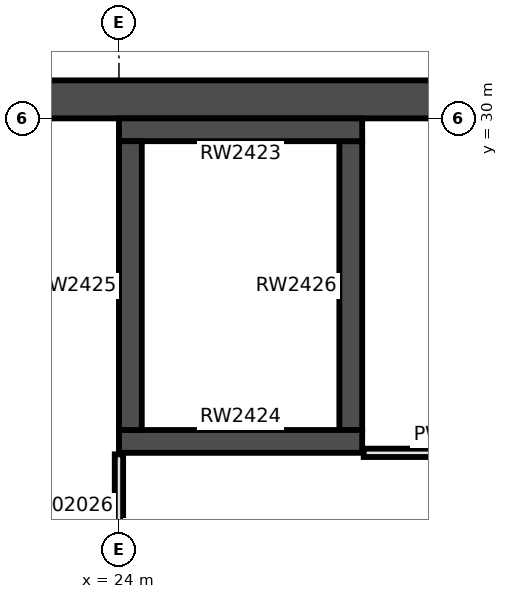
"""IFC4 building model, lengths in metres.
Left out: names, types, materials, properties, quantities, classifications, styles, units other than length and angle.
Written with IfcOpenShell. Run it as: python <this file> out.ifc"""

import sys

from ifc_helpers import new_model, si_unit, direction, frame, frame_2d, origin, place, context, subcontext, project, spatial, rectangle, extrude, element, fill, save


model = new_model("IFC4")
c1 = context("Model", 3, precision=1e-05, world=origin(), true_north=direction((0.0, 1.0)))
c2 = subcontext(c1, "Body", "Model", "MODEL_VIEW")
j1 = project(units=[si_unit("LENGTHUNIT", "METRE"), si_unit("PLANEANGLEUNIT", "RADIAN")], contexts=[c1])
p1 = place(None, origin())
s1 = spatial("IfcSite", under=j1, at=p1, CompositionType="ELEMENT")
p2 = place(p1, origin())
s2 = spatial("IfcBuilding", under=s1, at=p2, CompositionType="ELEMENT")
p3 = place(p2, frame((0.0, 0.0, 12.0)))
s3 = spatial("IfcBuildingStorey", under=s2, at=p3, CompositionType="ELEMENT", Elevation=12.0)
p4 = place(p3, frame((24.0, 29.85, 0.0), z_axis=(0.0, 0.0, 1.0), x_axis=(1.0, 0.0, 0.0)))
e1 = element("IfcWall", 1, at=p4, inside=s3, PredefinedType="SHEAR", context=c2, shape_type="SweptSolid", body=[
    extrude(rectangle(XDim=3.2, YDim=0.3, at=frame_2d((1.6, 0.0))), origin(), (0.0, 0.0, 1.0), 4.5),
])
p5 = place(p3, frame((24.0, 25.75, 0.0), z_axis=(0.0, 0.0, 1.0), x_axis=(1.0, 0.0, 0.0)))
e2 = element("IfcWall", 2, at=p5, inside=s3, PredefinedType="SHEAR", context=c2, shape_type="SweptSolid", body=[
    extrude(rectangle(XDim=3.2, YDim=0.3, at=frame_2d((1.6, 0.0))), origin(), (0.0, 0.0, 1.0), 4.5),
])
p6 = place(p5, frame((0.4, 0.0, 0.0)))
e3 = element("IfcOpeningElement", 3, at=p6, cuts=e2, PredefinedType="OPENING", context=c2, shape_type="SweptSolid", body=[
    extrude(rectangle(XDim=2.4, YDim=2.4, at=frame_2d((1.2, 1.2))), frame((0.0, 0.16, 0.0), z_axis=(0.0, -1.0, 0.0), x_axis=(1.0, 0.0, 0.0)), (0.0, 0.0, 1.0), 0.32),
])
for number, where, z_axis, x_axis in (
    (4, (24.15, 25.9, 0.0), (0.0, 0.0, 1.0), (0.0, 1.0, 0.0)),
    (5, (27.05, 25.9, 0.0), (0.0, 0.0, 1.0), (0.0, 1.0, 0.0)),
):
    element("IfcWall", number, at=place(p3, frame(where, z_axis=z_axis, x_axis=x_axis)), inside=s3, PredefinedType="SHEAR", context=c2, shape_type="SweptSolid", body=[
        extrude(rectangle(XDim=3.8, YDim=0.3, at=frame_2d((1.9, 0.0))), origin(), (0.0, 0.0, 1.0), 4.5),
    ])
p7 = place(p3, frame((18.5, 30.25, 0.0), z_axis=(0.0, 0.0, 1.0), x_axis=(1.0, 0.0, 0.0)))
e6 = element("IfcWall", 6, at=p7, inside=s3, PredefinedType="SHEAR", context=c2, shape_type="SweptSolid", body=[
    extrude(rectangle(XDim=29.0, YDim=0.5, at=frame_2d((14.5, 0.0))), origin(), (0.0, 0.0, 1.0), 4.5),
])
p8 = place(p3, frame((24.0, 24.22, 0.0), z_axis=(0.0, 0.0, 1.0), x_axis=(0.0, 1.0, 0.0)))
e7 = element("IfcWall", 7, at=p8, inside=s3, PredefinedType="PARTITIONING", context=c2, shape_type="SweptSolid", body=[
    extrude(rectangle(XDim=1.36, YDim=0.11, at=frame_2d((0.68, 0.0))), origin(), (0.0, 0.0, 1.0), 4.28),
])
p9 = place(p3, frame((27.22, 25.6, 0.0), z_axis=(0.0, 0.0, 1.0), x_axis=(1.0, 0.0, 0.0)))
e8 = element("IfcWall", 8, at=p9, inside=s3, PredefinedType="PARTITIONING", context=c2, shape_type="SweptSolid", body=[
    extrude(rectangle(XDim=2.78, YDim=0.11, at=frame_2d((1.39, 0.0))), origin(), (0.0, 0.0, 1.0), 4.28),
])
p10 = place(p9, frame((1.03, 0.0, 0.0)))
e9 = element("IfcOpeningElement", 9, at=p10, cuts=e8, PredefinedType="OPENING", context=c2, shape_type="SweptSolid", body=[
    extrude(rectangle(XDim=0.75, YDim=2.04, at=frame_2d((0.375, 1.02))), frame((0.0, 0.065, 0.0), z_axis=(0.0, -1.0, 0.0), x_axis=(1.0, 0.0, 0.0)), (0.0, 0.0, 1.0), 0.13),
])
p11 = place(p6, origin())
e10 = element("IfcDoor", 10, at=p11, inside=s3, OperationType="DOUBLE_DOOR_SLIDING", PredefinedType="DOOR", context=c2, shape_type="SweptSolid", body=[
    extrude(rectangle(XDim=2.4, YDim=2.4, at=frame_2d((1.2, 1.2))), frame((0.0, 0.025, 0.0), z_axis=(0.0, -1.0, 0.0), x_axis=(1.0, 0.0, 0.0)), (0.0, 0.0, 1.0), 0.05),
])
fill(e3, e10)
save(model, sys.argv[1])
